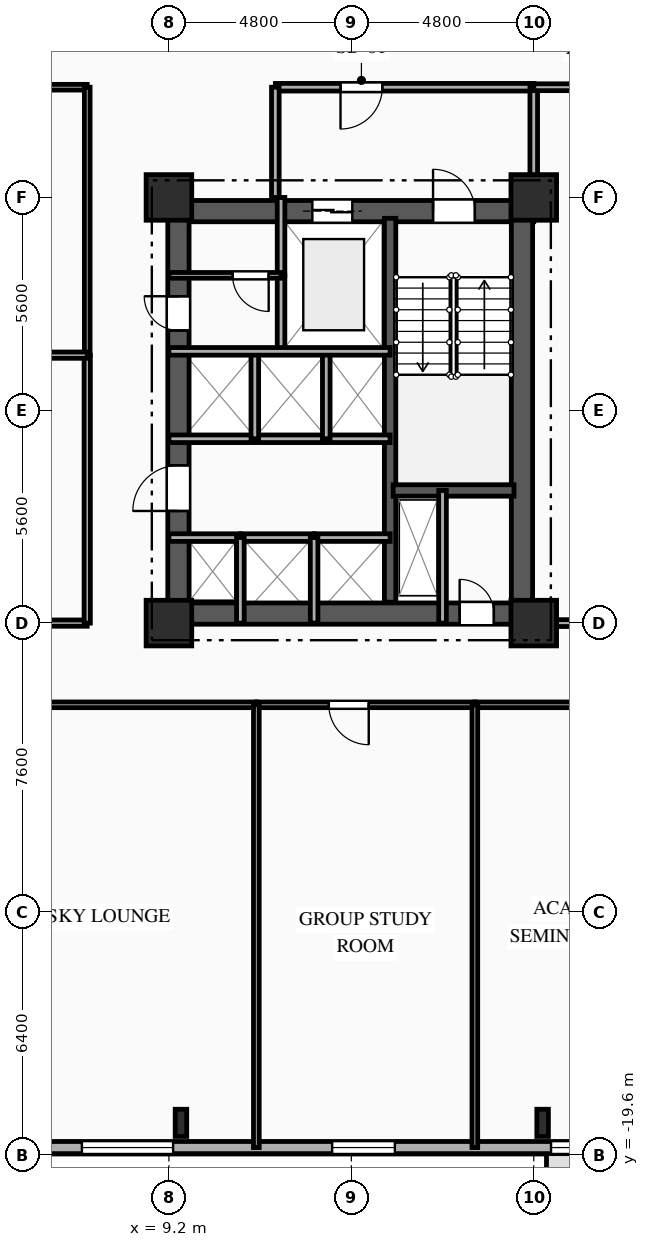
"""IFC4 building model, lengths in metres.
Left out: names, types, materials, properties, quantities, classifications, styles, units other than length and angle.
Written with IfcOpenShell. Run it as: python <this file> out.ifc"""

import sys

from ifc_helpers import new_model, si_unit, direction, frame, frame_2d, origin, origin_2d, place, context, subcontext, project, spatial, rectangle, i_section, extrude, element, fill, save


model = new_model("IFC4")
c1 = context("Model", 3, precision=1e-05, world=origin(), true_north=direction((0.0, 1.0)))
c2 = subcontext(c1, "Body", "Model", "MODEL_VIEW")
j1 = project(units=[si_unit("LENGTHUNIT", "METRE"), si_unit("PLANEANGLEUNIT", "RADIAN")], contexts=[c1])
p1 = place(None, origin())
s1 = spatial("IfcSite", under=j1, at=p1, CompositionType="ELEMENT")
p2 = place(p1, origin())
s2 = spatial("IfcBuilding", under=s1, at=p2, CompositionType="ELEMENT")
p3 = place(p2, frame((0.0, 0.0, 47.1)))
s3 = spatial("IfcBuildingStorey", under=s2, at=p3, CompositionType="ELEMENT", Elevation=47.1)
for number, where, z_axis, x_axis in (
    (1, (9.2, -5.6, 0.0), (0.0, 0.0, 1.0), (1.0, 0.0, 0.0)),
    (2, (9.2, 5.6, 0.0), (0.0, 0.0, 1.0), (1.0, 0.0, 0.0)),
    (3, (18.8, -5.6, 0.0), (0.0, 0.0, 1.0), (1.0, 0.0, 0.0)),
    (4, (18.8, 5.6, 0.0), (0.0, 0.0, 1.0), (1.0, 0.0, 0.0)),
):
    element("IfcColumn", number, at=place(p3, frame(where, z_axis=z_axis, x_axis=x_axis)), inside=s3, PredefinedType="COLUMN", context=c2, shape_type="SweptSolid", body=[
        extrude(rectangle(XDim=1.2, YDim=1.2, at=origin_2d()), origin(), (0.0, 0.0, 1.0), 3.35),
    ])
for number, where, z_axis, x_axis in (
    (5, (9.517, -18.75, 0.0), (0.0, 0.0, 1.0), (1.0, 0.0, 0.0)),
    (6, (19.033, -18.75, 0.0), (0.0, 0.0, 1.0), (1.0, 0.0, 0.0)),
):
    element("IfcColumn", number, at=place(p3, frame(where, z_axis=z_axis, x_axis=x_axis)), inside=s3, PredefinedType="COLUMN", context=c2, shape_type="SweptSolid", body=[
        extrude(i_section(OverallWidth=0.304, OverallDepth=0.716, WebThickness=0.021, FlangeThickness=0.04, FilletRadius=0.027, at=origin_2d()), origin(), (0.0, 0.0, 1.0), 3.35),
    ])
p4 = place(p3, frame((29.2, -19.4, 0.0), z_axis=(0.0, 0.0, 1.0), x_axis=(-1.0, 0.0, 0.0)))
e7 = element("IfcWall", 7, at=p4, inside=s3, PredefinedType="SOLIDWALL", context=c2, shape_type="SweptSolid", body=[
    extrude(rectangle(XDim=23.6, YDim=0.32, at=frame_2d((11.8, 0.0))), origin(), (0.0, 0.0, 1.0), 3.035),
])
p5 = place(p4, frame((8.295, 0.0, 0.85)))
e8 = element("IfcOpeningElement", 8, at=p5, cuts=e7, PredefinedType="OPENING", context=c2, shape_type="SweptSolid", body=[
    extrude(rectangle(XDim=1.65, YDim=1.85, at=frame_2d((0.825, 0.925))), frame((0.0, 0.17, 0.0), z_axis=(0.0, -1.0, 0.0), x_axis=(1.0, 0.0, 0.0)), (0.0, 0.0, 1.0), 0.34),
])
p6 = place(p4, frame((14.055, 0.0, 0.85)))
e9 = element("IfcOpeningElement", 9, at=p6, cuts=e7, PredefinedType="OPENING", context=c2, shape_type="SweptSolid", body=[
    extrude(rectangle(XDim=1.65, YDim=1.85, at=frame_2d((0.825, 0.925))), frame((0.0, 0.17, 0.0), z_axis=(0.0, -1.0, 0.0), x_axis=(1.0, 0.0, 0.0)), (0.0, 0.0, 1.0), 0.34),
])
p7 = place(p4, frame((19.89, 0.0, 0.85)))
e10 = element("IfcOpeningElement", 10, at=p7, cuts=e7, PredefinedType="OPENING", context=c2, shape_type="SweptSolid", body=[
    extrude(rectangle(XDim=2.4, YDim=1.95, at=frame_2d((1.2, 0.975))), frame((0.0, 0.17, 0.0), z_axis=(0.0, -1.0, 0.0), x_axis=(1.0, 0.0, 0.0)), (0.0, 0.0, 1.0), 0.34),
])
p8 = place(p3, frame((9.2, 5.24, 0.0), z_axis=(0.0, 0.0, 1.0), x_axis=(1.0, 0.0, 0.0)))
e11 = element("IfcWall", 11, at=p8, inside=s3, PredefinedType="SHEAR", context=c2, shape_type="SweptSolid", body=[
    extrude(rectangle(XDim=9.6, YDim=0.56, at=frame_2d((4.8, 0.0))), origin(), (0.0, 0.0, 1.0), 3.035),
])
p9 = place(p8, frame((6.95, 0.0, 0.0)))
e12 = element("IfcOpeningElement", 12, at=p9, cuts=e11, PredefinedType="OPENING", context=c2, shape_type="SweptSolid", body=[
    extrude(rectangle(XDim=1.1, YDim=2.15, at=frame_2d((0.55, 1.075))), frame((0.0, 0.29, 0.0), z_axis=(0.0, -1.0, 0.0), x_axis=(1.0, 0.0, 0.0)), (0.0, 0.0, 1.0), 0.58),
])
p10 = place(p8, frame((3.775, 0.0, 0.0)))
e13 = element("IfcOpeningElement", 13, at=p10, cuts=e11, PredefinedType="OPENING", context=c2, shape_type="SweptSolid", body=[
    extrude(rectangle(XDim=1.05, YDim=2.1, at=frame_2d((0.525, 1.05))), frame((0.0, 0.29, 0.0), z_axis=(0.0, -1.0, 0.0), x_axis=(1.0, 0.0, 0.0)), (0.0, 0.0, 1.0), 0.58),
])
p11 = place(p3, frame((9.2, -5.35, 0.0), z_axis=(0.0, 0.0, 1.0), x_axis=(1.0, 0.0, 0.0)))
e14 = element("IfcWall", 14, at=p11, inside=s3, PredefinedType="SHEAR", context=c2, shape_type="SweptSolid", body=[
    extrude(rectangle(XDim=9.6, YDim=0.56, at=frame_2d((4.8, 0.0))), origin(), (0.0, 0.0, 1.0), 3.035),
])
p12 = place(p11, frame((7.65, 0.0, 0.0)))
e15 = element("IfcOpeningElement", 15, at=p12, cuts=e14, PredefinedType="OPENING", context=c2, shape_type="SweptSolid", body=[
    extrude(rectangle(XDim=0.9, YDim=2.1, at=frame_2d((0.45, 1.05))), frame((0.0, 0.29, 0.0), z_axis=(0.0, -1.0, 0.0), x_axis=(1.0, 0.0, 0.0)), (0.0, 0.0, 1.0), 0.58),
])
p13 = place(p3, frame((9.45, -5.05, 0.0), z_axis=(0.0, 0.0, 1.0), x_axis=(0.0, 1.0, 0.0)))
e16 = element("IfcWall", 16, at=p13, inside=s3, PredefinedType="SHEAR", context=c2, shape_type="SweptSolid", body=[
    extrude(rectangle(XDim=10.1, YDim=0.56, at=frame_2d((5.05, 0.0))), origin(), (0.0, 0.0, 1.0), 3.035),
])
p14 = place(p13, frame((7.15, 0.0, 0.0)))
e17 = element("IfcOpeningElement", 17, at=p14, cuts=e16, PredefinedType="OPENING", context=c2, shape_type="SweptSolid", body=[
    extrude(rectangle(XDim=0.9, YDim=2.1, at=frame_2d((0.45, 1.05))), frame((0.0, 0.29, 0.0), z_axis=(0.0, -1.0, 0.0), x_axis=(1.0, 0.0, 0.0)), (0.0, 0.0, 1.0), 0.58),
])
p15 = place(p13, frame((2.4, 0.0, 0.0)))
e18 = element("IfcOpeningElement", 18, at=p15, cuts=e16, PredefinedType="OPENING", context=c2, shape_type="SweptSolid", body=[
    extrude(rectangle(XDim=1.2, YDim=2.15, at=frame_2d((0.6, 1.075))), frame((0.0, 0.29, 0.0), z_axis=(0.0, -1.0, 0.0), x_axis=(1.0, 0.0, 0.0)), (0.0, 0.0, 1.0), 0.58),
])
p16 = place(p3, frame((18.49, -5.05, 0.0), z_axis=(0.0, 0.0, 1.0), x_axis=(0.0, 1.0, 0.0)))
e19 = element("IfcWall", 19, at=p16, inside=s3, PredefinedType="SHEAR", context=c2, shape_type="SweptSolid", body=[
    extrude(rectangle(XDim=10.1, YDim=0.56, at=frame_2d((5.05, 0.0))), origin(), (0.0, 0.0, 1.0), 3.035),
])
p17 = place(p3, frame((15.02, -5.05, 0.0), z_axis=(0.0, 0.0, 1.0), x_axis=(0.0, 1.0, 0.0)))
e20 = element("IfcWall", 20, at=p17, inside=s3, PredefinedType="SHEAR", context=c2, shape_type="SweptSolid", body=[
    extrude(rectangle(XDim=10.1, YDim=0.3, at=frame_2d((5.05, 0.0))), origin(), (0.0, 0.0, 1.0), 3.035),
])
p18 = place(p3, frame((15.1, -2.11, 0.0), z_axis=(0.0, 0.0, 1.0), x_axis=(1.0, 0.0, 0.0)))
e21 = element("IfcWall", 21, at=p18, inside=s3, PredefinedType="SHEAR", context=c2, shape_type="SweptSolid", body=[
    extrude(rectangle(XDim=3.18, YDim=0.3, at=frame_2d((1.59, 0.0))), origin(), (0.0, 0.0, 1.0), 3.035),
])
p19 = place(p3, frame((16.4, -2.11, 0.0), z_axis=(0.0, 0.0, 1.0), x_axis=(0.0, -1.0, 0.0)))
e22 = element("IfcWall", 22, at=p19, inside=s3, PredefinedType="PARTITIONING", context=c2, shape_type="SweptSolid", body=[
    extrude(rectangle(XDim=3.49, YDim=0.2, at=frame_2d((1.745, 0.0))), origin(), (0.0, 0.0, 1.0), 3.035),
])
p20 = place(p3, frame((12.15, 3.55, 0.0), z_axis=(0.0, 0.0, 1.0), x_axis=(0.0, -1.0, 0.0)))
e23 = element("IfcWall", 23, at=p20, inside=s3, PredefinedType="PARTITIONING", context=c2, shape_type="SweptSolid", body=[
    extrude(rectangle(XDim=2.0, YDim=0.2, at=frame_2d((1.0, 0.0))), origin(), (0.0, 0.0, 1.0), 3.035),
])
p21 = place(p3, frame((12.15, 5.6, 0.0), z_axis=(0.0, 0.0, 1.0), x_axis=(0.0, -1.0, 0.0)))
e24 = element("IfcWall", 24, at=p21, inside=s3, PredefinedType="PARTITIONING", context=c2, shape_type="SweptSolid", body=[
    extrude(rectangle(XDim=2.05, YDim=0.2, at=frame_2d((1.025, 0.0))), origin(), (0.0, 0.0, 1.0), 3.035),
])
p22 = place(p3, frame((18.8, 8.5, 0.0), z_axis=(0.0, 0.0, 1.0), x_axis=(-1.0, 0.0, 0.0)))
e25 = element("IfcWall", 25, at=p22, inside=s3, PredefinedType="PARTITIONING", context=c2, shape_type="SweptSolid", body=[
    extrude(rectangle(XDim=6.8, YDim=0.2, at=frame_2d((3.4, 0.0))), origin(), (0.0, 0.0, 1.0), 3.035),
])
p23 = place(p22, frame((3.985, 0.0, 0.0)))
e26 = element("IfcOpeningElement", 26, at=p23, cuts=e25, PredefinedType="OPENING", context=c2, shape_type="SweptSolid", body=[
    extrude(rectangle(XDim=1.1, YDim=2.15, at=frame_2d((0.55, 1.075))), frame((0.0, 0.11, 0.0), z_axis=(0.0, -1.0, 0.0), x_axis=(1.0, 0.0, 0.0)), (0.0, 0.0, 1.0), 0.22),
])
p24 = place(p3, frame((12.0, 8.5, 0.0), z_axis=(0.0, 0.0, 1.0), x_axis=(0.0, -1.0, 0.0)))
e27 = element("IfcWall", 27, at=p24, inside=s3, PredefinedType="PARTITIONING", context=c2, shape_type="SweptSolid", body=[
    extrude(rectangle(XDim=2.9, YDim=0.2, at=frame_2d((1.45, 0.0))), origin(), (0.0, 0.0, 1.0), 3.035),
])
p25 = place(p3, frame((18.8, 5.6, 0.0), z_axis=(0.0, 0.0, 1.0), x_axis=(0.0, 1.0, 0.0)))
e28 = element("IfcWall", 28, at=p25, inside=s3, PredefinedType="PARTITIONING", context=c2, shape_type="SweptSolid", body=[
    extrude(rectangle(XDim=2.9, YDim=0.2, at=frame_2d((1.45, 0.0))), origin(), (0.0, 0.0, 1.0), 2.52),
])
p26 = place(p3, frame((12.15, 3.55, 0.0), z_axis=(0.0, 0.0, 1.0), x_axis=(-1.0, 0.0, 0.0)))
e29 = element("IfcWall", 29, at=p26, inside=s3, PredefinedType="PARTITIONING", context=c2, shape_type="SweptSolid", body=[
    extrude(rectangle(XDim=2.95, YDim=0.15, at=frame_2d((1.475, 0.0))), origin(), (0.0, 0.0, 1.0), 3.035),
])
p27 = place(p26, frame((0.325, 0.0, 0.0)))
e30 = element("IfcOpeningElement", 30, at=p27, cuts=e29, PredefinedType="OPENING", context=c2, shape_type="SweptSolid", body=[
    extrude(rectangle(XDim=0.95, YDim=2.1, at=frame_2d((0.475, 1.05))), frame((0.0, 0.085, 0.0), z_axis=(0.0, -1.0, 0.0), x_axis=(1.0, 0.0, 0.0)), (0.0, 0.0, 1.0), 0.17),
])
p28 = place(p3, frame((9.2, -3.35, 0.0), z_axis=(0.0, 0.0, 1.0), x_axis=(1.0, 0.0, 0.0)))
e31 = element("IfcWall", 31, at=p28, inside=s3, PredefinedType="PARTITIONING", context=c2, shape_type="SweptSolid", body=[
    extrude(rectangle(XDim=1.88, YDim=0.2, at=frame_2d((0.94, 0.0))), origin(), (0.0, 0.0, 1.0), 2.75),
])
p29 = place(p3, frame((11.08, -3.35, 0.0), z_axis=(0.0, 0.0, 1.0), x_axis=(1.0, 0.0, 0.0)))
e32 = element("IfcWall", 32, at=p29, inside=s3, PredefinedType="PARTITIONING", context=c2, shape_type="SweptSolid", body=[
    extrude(rectangle(XDim=1.94, YDim=0.2, at=frame_2d((0.97, 0.0))), origin(), (0.0, 0.0, 1.0), 3.035),
])
p30 = place(p3, frame((13.02, -3.35, 0.0), z_axis=(0.0, 0.0, 1.0), x_axis=(1.0, 0.0, 0.0)))
e33 = element("IfcWall", 33, at=p30, inside=s3, PredefinedType="PARTITIONING", context=c2, shape_type="SweptSolid", body=[
    extrude(rectangle(XDim=2.0, YDim=0.2, at=frame_2d((1.0, 0.0))), origin(), (0.0, 0.0, 1.0), 3.035),
])
p31 = place(p3, frame((11.46, -0.75, 0.0), z_axis=(0.0, 0.0, 1.0), x_axis=(-1.0, 0.0, 0.0)))
e34 = element("IfcWall", 34, at=p31, inside=s3, PredefinedType="PARTITIONING", context=c2, shape_type="SweptSolid", body=[
    extrude(rectangle(XDim=2.26, YDim=0.2, at=frame_2d((1.13, 0.0))), origin(), (0.0, 0.0, 1.0), 3.035),
])
p32 = place(p3, frame((13.34, -0.75, 0.0), z_axis=(0.0, 0.0, 1.0), x_axis=(-1.0, 0.0, 0.0)))
e35 = element("IfcWall", 35, at=p32, inside=s3, PredefinedType="PARTITIONING", context=c2, shape_type="SweptSolid", body=[
    extrude(rectangle(XDim=1.88, YDim=0.2, at=frame_2d((0.94, 0.0))), origin(), (0.0, 0.0, 1.0), 3.035),
])
p33 = place(p3, frame((15.02, -0.75, 0.0), z_axis=(0.0, 0.0, 1.0), x_axis=(-1.0, 0.0, 0.0)))
e36 = element("IfcWall", 36, at=p33, inside=s3, PredefinedType="PARTITIONING", context=c2, shape_type="SweptSolid", body=[
    extrude(rectangle(XDim=1.68, YDim=0.2, at=frame_2d((0.84, 0.0))), origin(), (0.0, 0.0, 1.0), 3.035),
])
for number, where, z_axis, x_axis in (
    (37, (11.08, -5.6, 0.0), (0.0, 0.0, 1.0), (0.0, 1.0, 0.0)),
    (38, (13.02, -5.6, 0.0), (0.0, 0.0, 1.0), (0.0, 1.0, 0.0)),
):
    element("IfcWall", number, at=place(p3, frame(where, z_axis=z_axis, x_axis=x_axis)), inside=s3, PredefinedType="PARTITIONING", context=c2, shape_type="SweptSolid", body=[
        extrude(rectangle(XDim=2.25, YDim=0.2, at=frame_2d((1.125, 0.0))), origin(), (0.0, 0.0, 1.0), 3.035),
    ])
for number, where, z_axis, x_axis in (
    (39, (11.46, -0.75, 0.0), (0.0, 0.0, 1.0), (0.0, 1.0, 0.0)),
    (40, (13.34, -0.75, 0.0), (0.0, 0.0, 1.0), (0.0, 1.0, 0.0)),
):
    element("IfcWall", number, at=place(p3, frame(where, z_axis=z_axis, x_axis=x_axis)), inside=s3, PredefinedType="PARTITIONING", context=c2, shape_type="SweptSolid", body=[
        extrude(rectangle(XDim=2.3, YDim=0.2, at=frame_2d((1.15, 0.0))), origin(), (0.0, 0.0, 1.0), 3.035),
    ])
p34 = place(p3, frame((21.45, 8.5, 0.0), z_axis=(0.0, 0.0, 1.0), x_axis=(-1.0, 0.0, 0.0)))
e41 = element("IfcWall", 41, at=p34, inside=s3, PredefinedType="PARTITIONING", context=c2, shape_type="SweptSolid", body=[
    extrude(rectangle(XDim=2.65, YDim=0.18, at=frame_2d((1.325, 0.0))), origin(), (0.0, 0.0, 1.0), 3.035),
])
p35 = place(p34, frame((0.641, 0.0, 0.0)))
e42 = element("IfcOpeningElement", 42, at=p35, cuts=e41, PredefinedType="OPENING", context=c2, shape_type="SweptSolid", body=[
    extrude(rectangle(XDim=1.0, YDim=2.15, at=frame_2d((0.5, 1.075))), frame((0.0, 0.1, 0.0), z_axis=(0.0, -1.0, 0.0), x_axis=(1.0, 0.0, 0.0)), (0.0, 0.0, 1.0), 0.2),
])
p36 = place(p3, frame((7.05, 8.5, 0.0), z_axis=(0.0, 0.0, 1.0), x_axis=(-1.0, 0.0, 0.0)))
e43 = element("IfcWall", 43, at=p36, inside=s3, PredefinedType="PARTITIONING", context=c2, shape_type="SweptSolid", body=[
    extrude(rectangle(XDim=7.05, YDim=0.15, at=frame_2d((3.525, 0.0))), origin(), (0.0, 0.0, 1.0), 3.035),
])
p37 = place(p3, frame((18.8, -5.6, 0.0), z_axis=(0.0, 0.0, 1.0), x_axis=(1.0, 0.0, 0.0)))
e44 = element("IfcWall", 44, at=p37, inside=s3, PredefinedType="PARTITIONING", context=c2, shape_type="SweptSolid", body=[
    extrude(rectangle(XDim=2.65, YDim=0.18, at=frame_2d((1.325, 0.0))), origin(), (0.0, 0.0, 1.0), 3.035),
])
p38 = place(p3, frame((11.5, -7.75, 0.0), z_axis=(0.0, 0.0, 1.0), x_axis=(-1.0, 0.0, 0.0)))
e45 = element("IfcWall", 45, at=p38, inside=s3, PredefinedType="PARTITIONING", context=c2, shape_type="SweptSolid", body=[
    extrude(rectangle(XDim=11.5, YDim=0.15, at=frame_2d((5.75, 0.0))), origin(), (0.0, 0.0, 1.0), 3.035),
])
p39 = place(p38, frame((8.709, 0.0, 0.0)))
e46 = element("IfcOpeningElement", 46, at=p39, cuts=e45, PredefinedType="OPENING", context=c2, shape_type="SweptSolid", body=[
    extrude(rectangle(XDim=1.05, YDim=2.15, at=frame_2d((0.525, 1.075))), frame((0.0, 0.085, 0.0), z_axis=(0.0, -1.0, 0.0), x_axis=(1.0, 0.0, 0.0)), (0.0, 0.0, 1.0), 0.17),
])
p40 = place(p3, frame((17.25, -7.75, 0.0), z_axis=(0.0, 0.0, 1.0), x_axis=(-1.0, 0.0, 0.0)))
e47 = element("IfcWall", 47, at=p40, inside=s3, PredefinedType="PARTITIONING", context=c2, shape_type="SweptSolid", body=[
    extrude(rectangle(XDim=5.75, YDim=0.15, at=frame_2d((2.875, 0.0))), origin(), (0.0, 0.0, 1.0), 3.035),
])
p41 = place(p40, frame((2.792, 0.0, 0.0)))
e48 = element("IfcOpeningElement", 48, at=p41, cuts=e47, PredefinedType="OPENING", context=c2, shape_type="SweptSolid", body=[
    extrude(rectangle(XDim=1.05, YDim=2.15, at=frame_2d((0.525, 1.075))), frame((0.0, 0.085, 0.0), z_axis=(0.0, -1.0, 0.0), x_axis=(1.0, 0.0, 0.0)), (0.0, 0.0, 1.0), 0.17),
])
p42 = place(p3, frame((23.0, -7.75, 0.0), z_axis=(0.0, 0.0, 1.0), x_axis=(-1.0, 0.0, 0.0)))
e49 = element("IfcWall", 49, at=p42, inside=s3, PredefinedType="PARTITIONING", context=c2, shape_type="SweptSolid", body=[
    extrude(rectangle(XDim=5.75, YDim=0.15, at=frame_2d((2.875, 0.0))), origin(), (0.0, 0.0, 1.0), 3.035),
])
p43 = place(p42, frame((1.022, 0.0, 0.0)))
e50 = element("IfcOpeningElement", 50, at=p43, cuts=e49, PredefinedType="OPENING", context=c2, shape_type="SweptSolid", body=[
    extrude(rectangle(XDim=1.05, YDim=2.15, at=frame_2d((0.525, 1.075))), frame((0.0, 0.085, 0.0), z_axis=(0.0, -1.0, 0.0), x_axis=(1.0, 0.0, 0.0)), (0.0, 0.0, 1.0), 0.17),
])
p44 = place(p3, frame((0.0, -5.6, 0.0), z_axis=(0.0, 0.0, 1.0), x_axis=(1.0, 0.0, 0.0)))
e51 = element("IfcWall", 51, at=p44, inside=s3, PredefinedType="PARTITIONING", context=c2, shape_type="SweptSolid", body=[
    extrude(rectangle(XDim=7.05, YDim=0.165, at=frame_2d((3.525, 0.0))), origin(), (0.0, 0.0, 1.0), 2.52),
])
p45 = place(p3, frame((7.05, -5.6, 0.0), z_axis=(0.0, 0.0, 1.0), x_axis=(0.0, 1.0, 0.0)))
e52 = element("IfcWall", 52, at=p45, inside=s3, PredefinedType="PARTITIONING", context=c2, shape_type="SweptSolid", body=[
    extrude(rectangle(XDim=7.05, YDim=0.165, at=frame_2d((3.525, 0.0))), origin(), (0.0, 0.0, 1.0), 3.035),
])
p46 = place(p3, frame((7.05, 1.45, 0.0), z_axis=(0.0, 0.0, 1.0), x_axis=(0.0, 1.0, 0.0)))
e53 = element("IfcWall", 53, at=p46, inside=s3, PredefinedType="PARTITIONING", context=c2, shape_type="SweptSolid", body=[
    extrude(rectangle(XDim=7.05, YDim=0.15, at=frame_2d((3.525, 0.0))), origin(), (0.0, 0.0, 1.0), 3.035),
])
for number, where, z_axis, x_axis in (
    (54, (11.5, -7.75, 0.0), (0.0, 0.0, 1.0), (0.0, -1.0, 0.0)),
    (55, (17.25, -7.75, 0.0), (0.0, 0.0, 1.0), (0.0, -1.0, 0.0)),
):
    element("IfcWall", number, at=place(p3, frame(where, z_axis=z_axis, x_axis=x_axis)), inside=s3, PredefinedType="PARTITIONING", context=c2, shape_type="SweptSolid", body=[
        extrude(rectangle(XDim=11.65, YDim=0.15, at=frame_2d((5.825, 0.0))), origin(), (0.0, 0.0, 1.0), 3.035),
    ])
p47 = place(p3, frame((-7.05, 1.45, 0.0), z_axis=(0.0, 0.0, 1.0), x_axis=(1.0, 0.0, 0.0)))
e56 = element("IfcWall", 56, at=p47, inside=s3, PredefinedType="PARTITIONING", context=c2, shape_type="SweptSolid", body=[
    extrude(rectangle(XDim=14.1, YDim=0.165, at=frame_2d((7.05, 0.0))), origin(), (0.0, 0.0, 1.0), 3.035),
])
p48 = place(p3, frame((9.2, 1.55, 0.0), z_axis=(0.0, 0.0, 1.0), x_axis=(1.0, 0.0, 0.0)))
e57 = element("IfcWall", 57, at=p48, inside=s3, PredefinedType="PARTITIONING", context=c2, shape_type="SweptSolid", body=[
    extrude(rectangle(XDim=5.82, YDim=0.2, at=frame_2d((2.91, 0.0))), origin(), (0.0, 0.0, 1.0), 3.035),
])
p49 = place(p5, origin())
e58 = element("IfcWindow", 58, at=p49, inside=s3, PartitioningType="SINGLE_PANEL", PredefinedType="WINDOW", context=c2, shape_type="SweptSolid", body=[
    extrude(rectangle(XDim=1.65, YDim=1.85, at=frame_2d((0.825, 0.925))), frame((0.0, 0.03, 0.0), z_axis=(0.0, -1.0, 0.0), x_axis=(1.0, 0.0, 0.0)), (0.0, 0.0, 1.0), 0.06),
])
fill(e8, e58)
p50 = place(p6, origin())
e59 = element("IfcWindow", 59, at=p50, inside=s3, PartitioningType="SINGLE_PANEL", PredefinedType="WINDOW", context=c2, shape_type="SweptSolid", body=[
    extrude(rectangle(XDim=1.65, YDim=1.85, at=frame_2d((0.825, 0.925))), frame((0.0, 0.03, 0.0), z_axis=(0.0, -1.0, 0.0), x_axis=(1.0, 0.0, 0.0)), (0.0, 0.0, 1.0), 0.06),
])
fill(e9, e59)
p51 = place(p7, origin())
e60 = element("IfcWindow", 60, at=p51, inside=s3, PartitioningType="SINGLE_PANEL", PredefinedType="WINDOW", context=c2, shape_type="SweptSolid", body=[
    extrude(rectangle(XDim=2.4, YDim=1.95, at=frame_2d((1.2, 0.975))), frame((0.0, 0.03, 0.0), z_axis=(0.0, -1.0, 0.0), x_axis=(1.0, 0.0, 0.0)), (0.0, 0.0, 1.0), 0.06),
])
fill(e10, e60)
p52 = place(p9, origin())
e61 = element("IfcDoor", 61, at=p52, inside=s3, OperationType="SINGLE_SWING_LEFT", PredefinedType="DOOR", context=c2, shape_type="SweptSolid", body=[
    extrude(rectangle(XDim=1.1, YDim=2.15, at=frame_2d((0.55, 1.075))), frame((0.0, 0.025, 0.0), z_axis=(0.0, -1.0, 0.0), x_axis=(1.0, 0.0, 0.0)), (0.0, 0.0, 1.0), 0.05),
])
fill(e12, e61)
p53 = place(p10, origin())
e62 = element("IfcDoor", 62, at=p53, inside=s3, OperationType="DOUBLE_DOOR_SLIDING", PredefinedType="DOOR", context=c2, shape_type="SweptSolid", body=[
    extrude(rectangle(XDim=1.05, YDim=2.1, at=frame_2d((0.525, 1.05))), frame((0.0, 0.025, 0.0), z_axis=(0.0, -1.0, 0.0), x_axis=(1.0, 0.0, 0.0)), (0.0, 0.0, 1.0), 0.05),
])
fill(e13, e62)
p54 = place(p12, origin())
e63 = element("IfcDoor", 63, at=p54, inside=s3, OperationType="SINGLE_SWING_LEFT", PredefinedType="DOOR", context=c2, shape_type="SweptSolid", body=[
    extrude(rectangle(XDim=0.9, YDim=2.1, at=frame_2d((0.45, 1.05))), frame((0.0, 0.025, 0.0), z_axis=(0.0, -1.0, 0.0), x_axis=(1.0, 0.0, 0.0)), (0.0, 0.0, 1.0), 0.05),
])
fill(e15, e63)
p55 = place(p23, origin())
e64 = element("IfcDoor", 64, at=p55, inside=s3, OperationType="SINGLE_SWING_RIGHT", PredefinedType="DOOR", context=c2, shape_type="SweptSolid", body=[
    extrude(rectangle(XDim=1.1, YDim=2.15, at=frame_2d((0.55, 1.075))), frame((0.0, 0.025, 0.0), z_axis=(0.0, -1.0, 0.0), x_axis=(1.0, 0.0, 0.0)), (0.0, 0.0, 1.0), 0.05),
])
fill(e26, e64)
p56 = place(p27, origin())
e65 = element("IfcDoor", 65, at=p56, inside=s3, OperationType="SINGLE_SWING_LEFT", PredefinedType="DOOR", context=c2, shape_type="SweptSolid", body=[
    extrude(rectangle(XDim=0.95, YDim=2.1, at=frame_2d((0.475, 1.05))), frame((0.0, 0.025, 0.0), z_axis=(0.0, -1.0, 0.0), x_axis=(1.0, 0.0, 0.0)), (0.0, 0.0, 1.0), 0.05),
])
fill(e30, e65)
p57 = place(p14, origin())
e66 = element("IfcDoor", 66, at=p57, inside=s3, OperationType="SINGLE_SWING_RIGHT", PredefinedType="DOOR", context=c2, shape_type="SweptSolid", body=[
    extrude(rectangle(XDim=0.9, YDim=2.1, at=frame_2d((0.45, 1.05))), frame((0.0, 0.025, 0.0), z_axis=(0.0, -1.0, 0.0), x_axis=(1.0, 0.0, 0.0)), (0.0, 0.0, 1.0), 0.05),
])
fill(e17, e66)
p58 = place(p15, origin())
e67 = element("IfcDoor", 67, at=p58, inside=s3, OperationType="SINGLE_SWING_LEFT", PredefinedType="DOOR", context=c2, shape_type="SweptSolid", body=[
    extrude(rectangle(XDim=1.2, YDim=2.15, at=frame_2d((0.6, 1.075))), frame((0.0, 0.025, 0.0), z_axis=(0.0, -1.0, 0.0), x_axis=(1.0, 0.0, 0.0)), (0.0, 0.0, 1.0), 0.05),
])
fill(e18, e67)
p59 = place(p41, origin())
e68 = element("IfcDoor", 68, at=p59, inside=s3, OperationType="SINGLE_SWING_LEFT", PredefinedType="DOOR", context=c2, shape_type="SweptSolid", body=[
    extrude(rectangle(XDim=1.05, YDim=2.15, at=frame_2d((0.525, 1.075))), frame((0.0, 0.025, 0.0), z_axis=(0.0, -1.0, 0.0), x_axis=(1.0, 0.0, 0.0)), (0.0, 0.0, 1.0), 0.05),
])
fill(e48, e68)
save(model, sys.argv[1])
